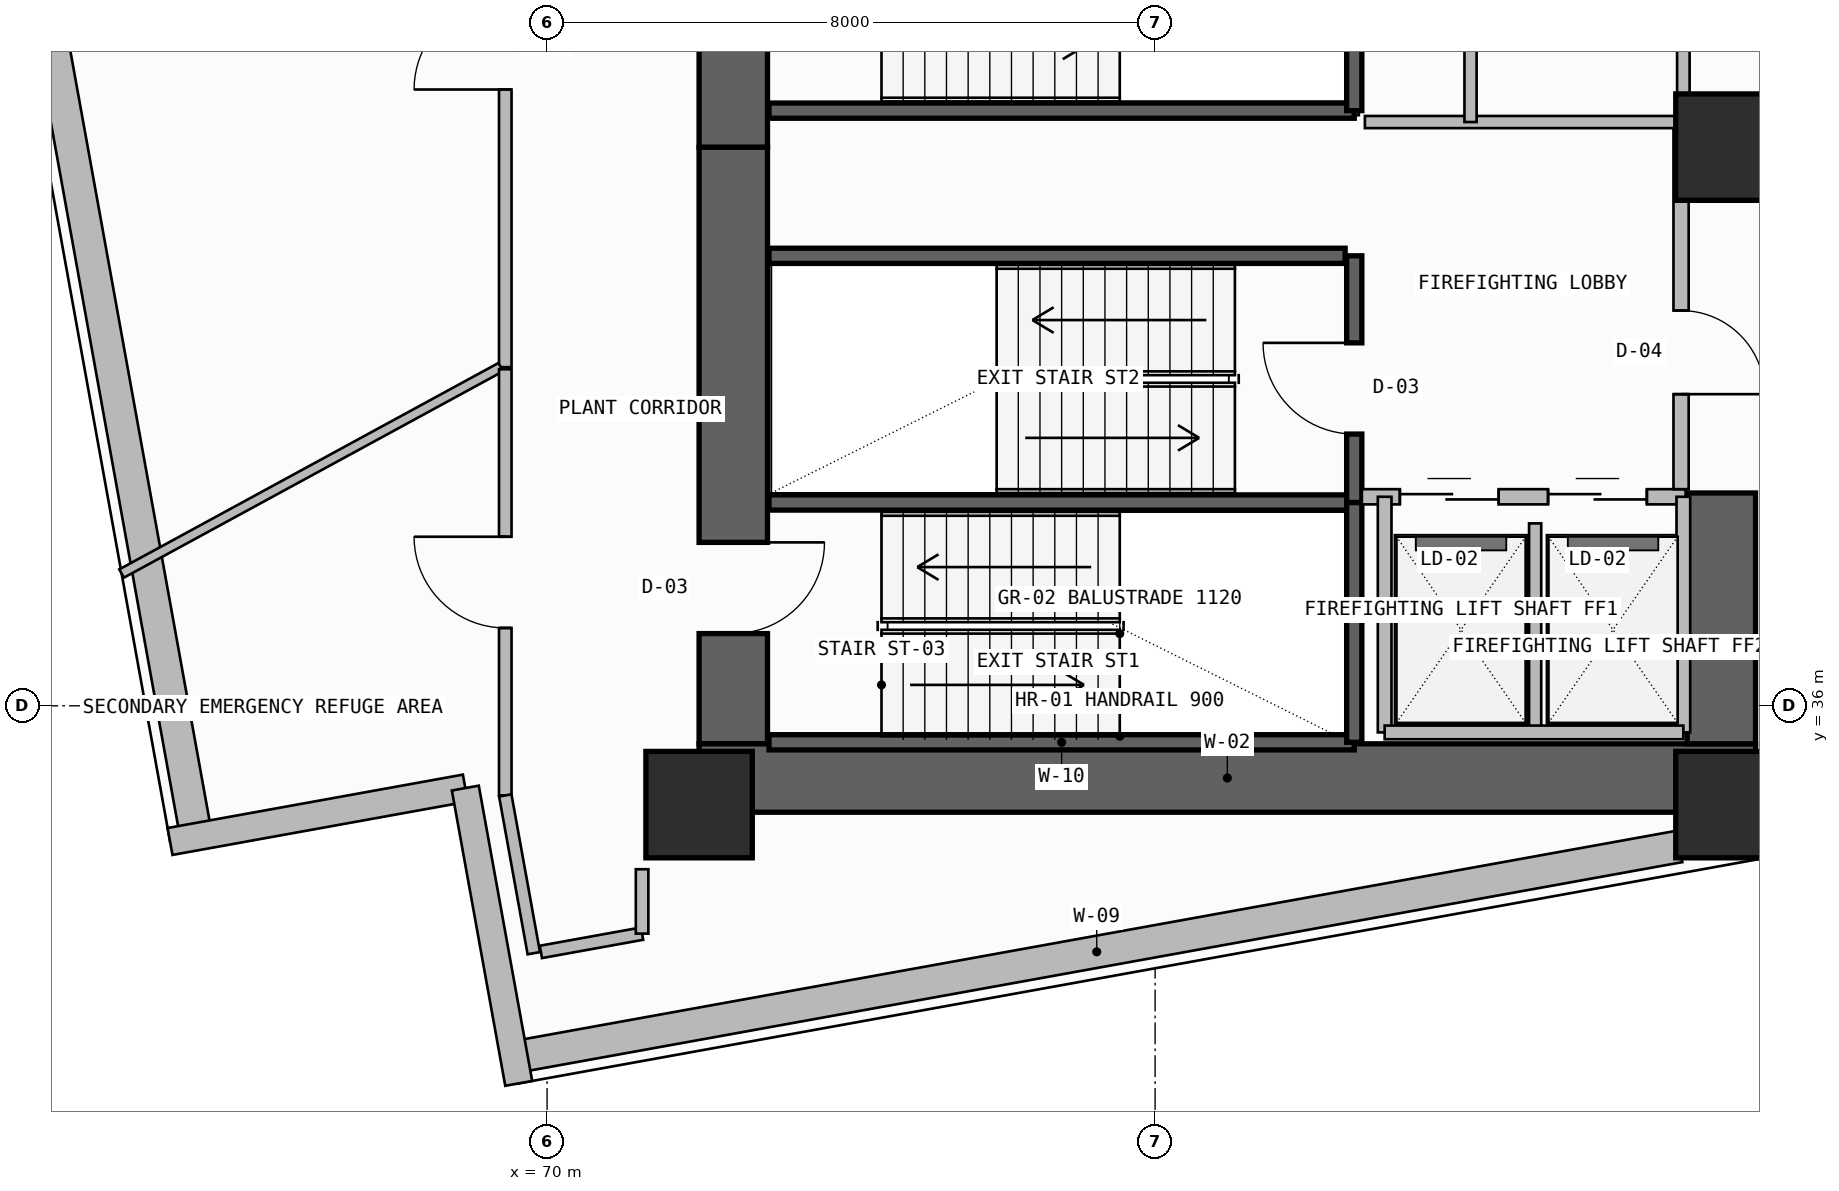
"""IFC4 building model, lengths in metres.
Left out: names, types, materials, properties, quantities, classifications, styles, units other than length and angle.
Written with IfcOpenShell. Run it as: python <this file> out.ifc"""

import sys

from ifc_helpers import new_model, si_unit, direction, frame, frame_2d, origin, origin_2d, place, context, subcontext, project, spatial, rectangle, extrude, element, fill, save


model = new_model("IFC4")
c1 = context("Model", 3, precision=1e-05, world=origin(), true_north=direction((0.0, 1.0)))
c2 = subcontext(c1, "Body", "Model", "MODEL_VIEW")
j1 = project(units=[si_unit("LENGTHUNIT", "METRE"), si_unit("PLANEANGLEUNIT", "RADIAN")], contexts=[c1])
p1 = place(None, origin())
s1 = spatial("IfcSite", under=j1, at=p1, CompositionType="ELEMENT")
p2 = place(p1, origin())
s2 = spatial("IfcBuilding", under=s1, at=p2, CompositionType="ELEMENT")
p3 = place(p2, frame((0.0, 0.0, 128.1)))
s3 = spatial("IfcBuildingStorey", under=s2, at=p3, CompositionType="ELEMENT", Elevation=128.1)
p4 = place(p3, frame((72.45, 35.5, -0.5), z_axis=(0.0, 0.0, 1.0), x_axis=(0.0, 1.0, 0.0)))
e1 = element("IfcWall", 1, at=p4, inside=s3, PredefinedType="SHEAR", context=c2, shape_type="SweptSolid", body=[
    extrude(rectangle(XDim=7.85, YDim=0.9, at=frame_2d((3.925, 0.0))), origin(), (0.0, 0.0, 1.0), 4.3),
])
p5 = place(p4, frame((1.45, 0.0, 0.5)))
e2 = element("IfcOpeningElement", 2, at=p5, cuts=e1, PredefinedType="OPENING", context=c2, shape_type="SweptSolid", body=[
    extrude(rectangle(XDim=1.2, YDim=2.2, at=frame_2d((0.6, 1.1))), frame((0.0, 0.46, 0.0), z_axis=(0.0, -1.0, 0.0), x_axis=(1.0, 0.0, 0.0)), (0.0, 0.0, 1.0), 0.92),
])
p6 = place(p3, frame((72.0, 35.05, -0.5), z_axis=(0.0, 0.0, 1.0), x_axis=(1.0, 0.0, 0.0)))
e3 = element("IfcWall", 3, at=p6, inside=s3, PredefinedType="SHEAR", context=c2, shape_type="SweptSolid", body=[
    extrude(rectangle(XDim=13.9, YDim=0.9, at=frame_2d((6.95, 0.0))), origin(), (0.0, 0.0, 1.0), 4.3),
])
p7 = place(p3, frame((85.45, 35.5, -0.5), z_axis=(0.0, 0.0, 1.0), x_axis=(0.0, 1.0, 0.0)))
e4 = element("IfcWall", 4, at=p7, inside=s3, PredefinedType="SHEAR", context=c2, shape_type="SweptSolid", body=[
    extrude(rectangle(XDim=3.3, YDim=0.9, at=frame_2d((1.65, 0.0))), origin(), (0.0, 0.0, 1.0), 4.3),
])
p8 = place(p3, frame((72.45, 43.35, -0.5), z_axis=(0.0, 0.0, 1.0), x_axis=(0.0, 1.0, 0.0)))
e5 = element("IfcWall", 5, at=p8, inside=s3, PredefinedType="SHEAR", context=c2, shape_type="SweptSolid", body=[
    extrude(rectangle(XDim=12.7, YDim=0.9, at=frame_2d((6.35, 0.0))), origin(), (0.0, 0.0, 1.0), 4.3),
])
p9 = place(p8, frame((1.35, 0.0, 0.5)))
e6 = element("IfcOpeningElement", 6, at=p9, cuts=e5, PredefinedType="OPENING", context=c2, shape_type="SweptSolid", body=[
    extrude(rectangle(XDim=1.2, YDim=2.2, at=frame_2d((0.6, 1.1))), frame((0.0, 0.46, 0.0), z_axis=(0.0, -1.0, 0.0), x_axis=(1.0, 0.0, 0.0)), (0.0, 0.0, 1.0), 0.92),
])
for number, where, z_axis, x_axis in (
    (7, (72.0, 34.7, 0.0), (0.0, 0.0, 1.0), (1.0, 0.0, 0.0)),
    (8, (85.55, 34.7, 0.0), (0.0, 0.0, 1.0), (1.0, 0.0, 0.0)),
    (9, (85.55, 43.35, 0.0), (0.0, 0.0, 1.0), (1.0, 0.0, 0.0)),
):
    element("IfcColumn", number, at=place(p3, frame(where, z_axis=z_axis, x_axis=x_axis)), inside=s3, PredefinedType="COLUMN", context=c2, shape_type="SweptSolid", body=[
        extrude(rectangle(XDim=1.4, YDim=1.4, at=origin_2d()), origin(), (0.0, 0.0, 1.0), 4.2),
    ])
p10 = place(p3, frame((69.565, 31.377, 0.0), z_axis=(0.0, 0.0, 1.0), x_axis=(0.98404091451, 0.177942346197, 0.0)))
e10 = element("IfcWall", 10, at=p10, inside=s3, PredefinedType="SOLIDWALL", context=c2, shape_type="SweptSolid", body=[
    extrude(rectangle(XDim=15.583, YDim=0.42, at=frame_2d((7.792, 0.0))), origin(), (0.0, 0.0, 1.0), 3.8),
])
p11 = place(p3, frame((62.99, 47.518, 0.0), z_axis=(0.0, 0.0, 1.0), x_axis=(0.177948058674, -0.984039881516, 0.0)))
e11 = element("IfcWall", 11, at=p11, inside=s3, PredefinedType="SOLIDWALL", context=c2, shape_type="SweptSolid", body=[
    extrude(rectangle(XDim=13.455, YDim=0.42, at=frame_2d((6.728, 0.0))), origin(), (0.0, 0.0, 1.0), 2.777),
])
p12 = place(p3, frame((65.039, 34.215, 0.0), z_axis=(0.0, 0.0, 1.0), x_axis=(0.984046535247, 0.177911260096, 0.0)))
e12 = element("IfcWall", 12, at=p12, inside=s3, PredefinedType="SOLIDWALL", context=c2, shape_type="SweptSolid", body=[
    extrude(rectangle(XDim=3.948, YDim=0.36, at=frame_2d((1.974, 0.0))), origin(), (0.0, 0.0, 1.0), 3.8),
])
p13 = place(p3, frame((68.924, 34.917, 0.0), z_axis=(0.0, 0.0, 1.0), x_axis=(0.177981971326, -0.984033748346, 0.0)))
e13 = element("IfcWall", 13, at=p13, inside=s3, PredefinedType="SOLIDWALL", context=c2, shape_type="SweptSolid", body=[
    extrude(rectangle(XDim=3.948, YDim=0.36, at=frame_2d((1.974, 0.0))), origin(), (0.0, 0.0, 1.0), 3.8),
])
for number, where, z_axis, x_axis in (
    (14, (72.92, 35.52, -0.5), (0.0, 0.0, 1.0), (1.0, 0.0, 0.0)),
    (15, (72.92, 38.675, -0.5), (0.0, 0.0, 1.0), (1.0, 0.0, 0.0)),
):
    element("IfcWall", number, at=place(p3, frame(where, z_axis=z_axis, x_axis=x_axis)), inside=s3, PredefinedType="SOLIDWALL", context=c2, shape_type="SweptSolid", body=[
        extrude(rectangle(XDim=7.7, YDim=0.2, at=frame_2d((3.85, 0.0))), origin(), (0.0, 0.0, 1.0), 4.3),
    ])
p14 = place(p3, frame((80.62, 35.52, -0.5), z_axis=(0.0, 0.0, 1.0), x_axis=(0.0, 1.0, 0.0)))
e16 = element("IfcWall", 16, at=p14, inside=s3, PredefinedType="SOLIDWALL", context=c2, shape_type="SweptSolid", body=[
    extrude(rectangle(XDim=3.155, YDim=0.2, at=frame_2d((1.578, 0.0))), origin(), (0.0, 0.0, 1.0), 4.3),
])
p15 = place(p3, frame((80.62, 38.675, -0.5), z_axis=(0.0, 0.0, 1.0), x_axis=(0.0, 1.0, 0.0)))
e17 = element("IfcWall", 17, at=p15, inside=s3, PredefinedType="SOLIDWALL", context=c2, shape_type="SweptSolid", body=[
    extrude(rectangle(XDim=3.245, YDim=0.2, at=frame_2d((1.623, 0.0))), origin(), (0.0, 0.0, 1.0), 4.3),
])
p16 = place(p15, frame((0.9, 0.0, 0.5)))
e18 = element("IfcOpeningElement", 18, at=p16, cuts=e17, PredefinedType="OPENING", context=c2, shape_type="SweptSolid", body=[
    extrude(rectangle(XDim=1.2, YDim=2.2, at=frame_2d((0.6, 1.1))), frame((0.0, 0.11, 0.0), z_axis=(0.0, -1.0, 0.0), x_axis=(1.0, 0.0, 0.0)), (0.0, 0.0, 1.0), 0.22),
])
p17 = place(p3, frame((80.72, 38.75, 0.0), z_axis=(0.0, 0.0, 1.0), x_axis=(1.0, 0.0, 0.0)))
e19 = element("IfcWall", 19, at=p17, inside=s3, PredefinedType="SOLIDWALL", context=c2, shape_type="SweptSolid", body=[
    extrude(rectangle(XDim=4.26, YDim=0.2, at=frame_2d((2.13, 0.0))), origin(), (0.0, 0.0, 1.0), 3.8),
])
p18 = place(p17, frame((0.5, 0.0, 0.0)))
e20 = element("IfcOpeningElement", 20, at=p18, cuts=e19, PredefinedType="OPENING", context=c2, shape_type="SweptSolid", body=[
    extrude(rectangle(XDim=1.3, YDim=2.3, at=frame_2d((0.65, 1.15))), frame((0.0, 0.11, 0.0), z_axis=(0.0, -1.0, 0.0), x_axis=(1.0, 0.0, 0.0)), (0.0, 0.0, 1.0), 0.22),
])
p19 = place(p17, frame((2.45, 0.0, 0.0)))
e21 = element("IfcOpeningElement", 21, at=p19, cuts=e19, PredefinedType="OPENING", context=c2, shape_type="SweptSolid", body=[
    extrude(rectangle(XDim=1.3, YDim=2.3, at=frame_2d((0.65, 1.15))), frame((0.0, 0.11, 0.0), z_axis=(0.0, -1.0, 0.0), x_axis=(1.0, 0.0, 0.0)), (0.0, 0.0, 1.0), 0.22),
])
p20 = place(p3, frame((83.0, 35.65, 0.0), z_axis=(0.0, 0.0, 1.0), x_axis=(0.0, 1.0, 0.0)))
e22 = element("IfcWall", 22, at=p20, inside=s3, PredefinedType="PLUMBINGWALL", context=c2, shape_type="SweptSolid", body=[
    extrude(rectangle(XDim=2.75, YDim=0.16, at=frame_2d((1.375, 0.0))), origin(), (0.0, 0.0, 1.0), 3.8),
])
for number, where, z_axis, x_axis in (
    (23, (84.95, 35.65, 0.0), (0.0, 0.0, 1.0), (0.0, 1.0, 0.0)),
    (24, (81.02, 35.65, 0.0), (0.0, 0.0, 1.0), (0.0, 1.0, 0.0)),
):
    element("IfcWall", number, at=place(p3, frame(where, z_axis=z_axis, x_axis=x_axis)), inside=s3, PredefinedType="SOLIDWALL", context=c2, shape_type="SweptSolid", body=[
        extrude(rectangle(XDim=3.1, YDim=0.18, at=frame_2d((1.55, 0.0))), origin(), (0.0, 0.0, 1.0), 3.8),
    ])
p21 = place(p3, frame((81.02, 35.65, 0.0), z_axis=(0.0, 0.0, 1.0), x_axis=(1.0, 0.0, 0.0)))
e25 = element("IfcWall", 25, at=p21, inside=s3, PredefinedType="SOLIDWALL", context=c2, shape_type="SweptSolid", body=[
    extrude(rectangle(XDim=3.93, YDim=0.18, at=frame_2d((1.965, 0.0))), origin(), (0.0, 0.0, 1.0), 3.8),
])
p22 = place(p3, frame((84.92, 38.85, 0.0), z_axis=(0.0, 0.0, 1.0), x_axis=(0.0, 1.0, 0.0)))
e26 = element("IfcWall", 26, at=p22, inside=s3, PredefinedType="SOLIDWALL", context=c2, shape_type="SweptSolid", body=[
    extrude(rectangle(XDim=4.83, YDim=0.2, at=frame_2d((2.415, 0.0))), origin(), (0.0, 0.0, 1.0), 3.8),
])
p23 = place(p22, frame((1.25, 0.0, 0.0)))
e27 = element("IfcOpeningElement", 27, at=p23, cuts=e26, PredefinedType="OPENING", context=c2, shape_type="SweptSolid", body=[
    extrude(rectangle(XDim=1.1, YDim=2.2, at=frame_2d((0.55, 1.1))), frame((0.0, 0.11, 0.0), z_axis=(0.0, -1.0, 0.0), x_axis=(1.0, 0.0, 0.0)), (0.0, 0.0, 1.0), 0.22),
])
p24 = place(p3, frame((72.92, 41.92, -0.5), z_axis=(0.0, 0.0, 1.0), x_axis=(1.0, 0.0, 0.0)))
e28 = element("IfcWall", 28, at=p24, inside=s3, PredefinedType="SOLIDWALL", context=c2, shape_type="SweptSolid", body=[
    extrude(rectangle(XDim=7.58, YDim=0.2, at=frame_2d((3.79, 0.0))), origin(), (0.0, 0.0, 1.0), 4.3),
])
p25 = place(p3, frame((72.92, 43.83, -0.5), z_axis=(0.0, 0.0, 1.0), x_axis=(1.0, 0.0, 0.0)))
e29 = element("IfcWall", 29, at=p25, inside=s3, PredefinedType="SOLIDWALL", context=c2, shape_type="SweptSolid", body=[
    extrude(rectangle(XDim=7.7, YDim=0.2, at=frame_2d((3.85, 0.0))), origin(), (0.0, 0.0, 1.0), 4.3),
])
p26 = place(p3, frame((80.62, 43.83, -0.5), z_axis=(0.0, 0.0, 1.0), x_axis=(0.0, 1.0, 0.0)))
e30 = element("IfcWall", 30, at=p26, inside=s3, PredefinedType="SOLIDWALL", context=c2, shape_type="SweptSolid", body=[
    extrude(rectangle(XDim=3.24, YDim=0.2, at=frame_2d((1.62, 0.0))), origin(), (0.0, 0.0, 1.0), 4.3),
])
p27 = place(p3, frame((84.95, 43.68, 0.0), z_axis=(0.0, 0.0, 1.0), x_axis=(0.0, 1.0, 0.0)))
e31 = element("IfcWall", 31, at=p27, inside=s3, PredefinedType="PLUMBINGWALL", context=c2, shape_type="SweptSolid", body=[
    extrude(rectangle(XDim=1.9, YDim=0.165, at=frame_2d((0.95, 0.0))), origin(), (0.0, 0.0, 1.0), 3.8),
])
p28 = place(p3, frame((80.76, 43.68, 0.0), z_axis=(0.0, 0.0, 1.0), x_axis=(1.0, 0.0, 0.0)))
e32 = element("IfcWall", 32, at=p28, inside=s3, PredefinedType="PLUMBINGWALL", context=c2, shape_type="SweptSolid", body=[
    extrude(rectangle(XDim=4.19, YDim=0.16, at=frame_2d((2.095, 0.0))), origin(), (0.0, 0.0, 1.0), 3.8),
])
p29 = place(p3, frame((82.15, 43.68, 0.0), z_axis=(0.0, 0.0, 1.0), x_axis=(0.0, 1.0, 0.0)))
e33 = element("IfcWall", 33, at=p29, inside=s3, PredefinedType="PLUMBINGWALL", context=c2, shape_type="SweptSolid", body=[
    extrude(rectangle(XDim=1.9, YDim=0.16, at=frame_2d((0.95, 0.0))), origin(), (0.0, 0.0, 1.0), 3.8),
])
p30 = place(p3, frame((69.45, 48.961, 0.0), z_axis=(0.0, 0.0, 1.0), x_axis=(0.0, -1.0, 0.0)))
e34 = element("IfcWall", 34, at=p30, inside=s3, PredefinedType="PARTITIONING", context=c2, shape_type="SweptSolid", body=[
    extrude(rectangle(XDim=8.506, YDim=0.165, at=frame_2d((4.253, 0.0))), origin(), (0.0, 0.0, 1.0), 3.8),
])
p31 = place(p30, frame((3.653, 0.0, 0.0)))
e35 = element("IfcOpeningElement", 35, at=p31, cuts=e34, PredefinedType="OPENING", context=c2, shape_type="SweptSolid", body=[
    extrude(rectangle(XDim=1.2, YDim=2.2, at=frame_2d((0.6, 1.1))), frame((0.0, 0.093, 0.0), z_axis=(0.0, -1.0, 0.0), x_axis=(1.0, 0.0, 0.0)), (0.0, 0.0, 1.0), 0.185),
])
p32 = place(p3, frame((69.39, 40.455, 0.0), z_axis=(0.0, 0.0, 1.0), x_axis=(-0.87836010214, -0.477999509382, 0.0)))
e36 = element("IfcWall", 36, at=p32, inside=s3, PredefinedType="PARTITIONING", context=c2, shape_type="SweptSolid", body=[
    extrude(rectangle(XDim=5.679, YDim=0.125, at=frame_2d((2.84, 0.0))), origin(), (0.0, 0.0, 1.0), 3.8),
])
p33 = place(p3, frame((69.45, 40.428, 0.0), z_axis=(0.0, 0.0, 1.0), x_axis=(0.0, -1.0, 0.0)))
e37 = element("IfcWall", 37, at=p33, inside=s3, PredefinedType="PARTITIONING", context=c2, shape_type="SweptSolid", body=[
    extrude(rectangle(XDim=5.607, YDim=0.165, at=frame_2d((2.803, 0.0))), origin(), (0.0, 0.0, 1.0), 3.8),
])
p34 = place(p33, frame((2.203, 0.0, 0.0)))
e38 = element("IfcOpeningElement", 38, at=p34, cuts=e37, PredefinedType="OPENING", context=c2, shape_type="SweptSolid", body=[
    extrude(rectangle(XDim=1.2, YDim=2.2, at=frame_2d((0.6, 1.1))), frame((0.0, 0.093, 0.0), z_axis=(0.0, -1.0, 0.0), x_axis=(1.0, 0.0, 0.0)), (0.0, 0.0, 1.0), 0.185),
])
p35 = place(p3, frame((69.45, 34.821, 0.0), z_axis=(0.0, 0.0, 1.0), x_axis=(0.17789736369, -0.984049047554, 0.0)))
e39 = element("IfcWall", 39, at=p35, inside=s3, PredefinedType="PARTITIONING", context=c2, shape_type="SweptSolid", body=[
    extrude(rectangle(XDim=2.109, YDim=0.165, at=frame_2d((1.055, 0.0))), origin(), (0.0, 0.0, 1.0), 3.8),
])
p36 = place(p3, frame((69.918, 32.762, 0.0), z_axis=(0.0, 0.0, 1.0), x_axis=(0.984022520329, 0.17804403805, 0.0)))
e40 = element("IfcWall", 40, at=p36, inside=s3, PredefinedType="PARTITIONING", context=c2, shape_type="SweptSolid", body=[
    extrude(rectangle(XDim=1.354, YDim=0.165, at=frame_2d((0.677, 0.0))), origin(), (0.0, 0.0, 1.0), 3.8),
])
p37 = place(p3, frame((71.25, 33.003, 0.0), z_axis=(0.0, 0.0, 1.0), x_axis=(0.0, 1.0, 0.0)))
e41 = element("IfcWall", 41, at=p37, inside=s3, PredefinedType="PARTITIONING", context=c2, shape_type="SweptSolid", body=[
    extrude(rectangle(XDim=0.847, YDim=0.165, at=frame_2d((0.424, 0.0))), origin(), (0.0, 0.0, 1.0), 3.8),
])
p38 = place(p5, frame((1.2, 0.0, 0.0), z_axis=(0.0, 0.0, 1.0), x_axis=(-1.0, 0.0, 0.0)))
e42 = element("IfcDoor", 42, at=p38, inside=s3, OperationType="SINGLE_SWING_LEFT", PredefinedType="USERDEFINED", context=c2, shape_type="SweptSolid", body=[
    extrude(rectangle(XDim=1.2, YDim=2.2, at=frame_2d((0.6, 1.1))), frame((0.0, 0.025, 0.0), z_axis=(0.0, -1.0, 0.0), x_axis=(1.0, 0.0, 0.0)), (0.0, 0.0, 1.0), 0.05),
])
fill(e2, e42)
p39 = place(p16, origin())
e43 = element("IfcDoor", 43, at=p39, inside=s3, OperationType="SINGLE_SWING_RIGHT", PredefinedType="USERDEFINED", context=c2, shape_type="SweptSolid", body=[
    extrude(rectangle(XDim=1.2, YDim=2.2, at=frame_2d((0.6, 1.1))), frame((0.0, 0.025, 0.0), z_axis=(0.0, -1.0, 0.0), x_axis=(1.0, 0.0, 0.0)), (0.0, 0.0, 1.0), 0.05),
])
fill(e18, e43)
p40 = place(p18, origin())
e44 = element("IfcDoor", 44, at=p40, inside=s3, OperationType="DOUBLE_DOOR_SLIDING", PredefinedType="DOOR", context=c2, shape_type="SweptSolid", body=[
    extrude(rectangle(XDim=1.3, YDim=2.3, at=frame_2d((0.65, 1.15))), frame((0.0, 0.025, 0.0), z_axis=(0.0, -1.0, 0.0), x_axis=(1.0, 0.0, 0.0)), (0.0, 0.0, 1.0), 0.05),
])
fill(e20, e44)
p41 = place(p19, origin())
e45 = element("IfcDoor", 45, at=p41, inside=s3, OperationType="DOUBLE_DOOR_SLIDING", PredefinedType="DOOR", context=c2, shape_type="SweptSolid", body=[
    extrude(rectangle(XDim=1.3, YDim=2.3, at=frame_2d((0.65, 1.15))), frame((0.0, 0.025, 0.0), z_axis=(0.0, -1.0, 0.0), x_axis=(1.0, 0.0, 0.0)), (0.0, 0.0, 1.0), 0.05),
])
fill(e21, e45)
p42 = place(p23, frame((1.1, 0.0, 0.0), z_axis=(0.0, 0.0, 1.0), x_axis=(-1.0, 0.0, 0.0)))
e46 = element("IfcDoor", 46, at=p42, inside=s3, OperationType="SINGLE_SWING_RIGHT", PredefinedType="DOOR", context=c2, shape_type="SweptSolid", body=[
    extrude(rectangle(XDim=1.1, YDim=2.2, at=frame_2d((0.55, 1.1))), frame((0.0, 0.025, 0.0), z_axis=(0.0, -1.0, 0.0), x_axis=(1.0, 0.0, 0.0)), (0.0, 0.0, 1.0), 0.05),
])
fill(e27, e46)
p43 = place(p31, frame((1.2, 0.0, 0.0), z_axis=(0.0, 0.0, 1.0), x_axis=(-1.0, 0.0, 0.0)))
e47 = element("IfcDoor", 47, at=p43, inside=s3, OperationType="SINGLE_SWING_LEFT", PredefinedType="USERDEFINED", context=c2, shape_type="SweptSolid", body=[
    extrude(rectangle(XDim=1.2, YDim=2.2, at=frame_2d((0.6, 1.1))), frame((0.0, 0.025, 0.0), z_axis=(0.0, -1.0, 0.0), x_axis=(1.0, 0.0, 0.0)), (0.0, 0.0, 1.0), 0.05),
])
fill(e35, e47)
p44 = place(p34, frame((1.2, 0.0, 0.0), z_axis=(0.0, 0.0, 1.0), x_axis=(-1.0, 0.0, 0.0)))
e48 = element("IfcDoor", 48, at=p44, inside=s3, OperationType="SINGLE_SWING_RIGHT", PredefinedType="USERDEFINED", context=c2, shape_type="SweptSolid", body=[
    extrude(rectangle(XDim=1.2, YDim=2.2, at=frame_2d((0.6, 1.1))), frame((0.0, 0.025, 0.0), z_axis=(0.0, -1.0, 0.0), x_axis=(1.0, 0.0, 0.0)), (0.0, 0.0, 1.0), 0.05),
])
fill(e38, e48)
save(model, sys.argv[1])
